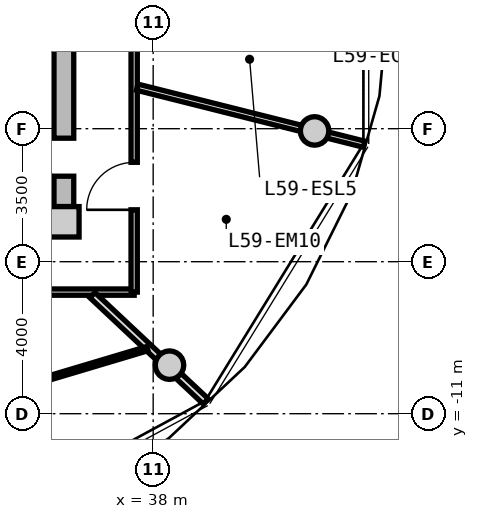
"""IFC4 building model, lengths in metres.
Left out: names, types, materials, properties, quantities, classifications, styles, units other than length and angle.
Written with IfcOpenShell. Run it as: python <this file> out.ifc"""

import sys

from ifc_helpers import new_model, si_unit, direction, frame, frame_2d, origin, origin_2d, place, context, subcontext, project, spatial, rectangle, circle, extrude, source, transform, mapped, element, fill, save


model = new_model("IFC4")
c1 = context("Model", 3, precision=1e-05, world=origin(), true_north=direction((0.0, 1.0)))
c2 = subcontext(c1, "Body", "Model", "MODEL_VIEW")
j1 = project(units=[si_unit("LENGTHUNIT", "METRE"), si_unit("PLANEANGLEUNIT", "RADIAN")], contexts=[c1])
p1 = place(None, origin())
s1 = spatial("IfcSite", under=j1, at=p1, CompositionType="ELEMENT")
p2 = place(p1, origin())
s2 = spatial("IfcBuilding", under=s1, at=p2, CompositionType="ELEMENT")
p3 = place(p2, frame((0.0, 0.0, 190.65)))
s3 = spatial("IfcBuildingStorey", under=s2, at=p3, CompositionType="ELEMENT", Elevation=190.65)
m1 = source(origin(), c2, "Body", "SweptSolid", [
    extrude(rectangle(XDim=0.8, YDim=0.8, at=origin_2d()), origin(), (0.0, 0.0, 1.0), 3.05),
])
p4 = place(p3, frame((35.65, -5.95, 0.0), z_axis=(0.0, 0.0, 1.0), x_axis=(1.0, 0.0, 0.0)))
e1 = element("IfcColumn", 1, at=p4, inside=s3, PredefinedType="COLUMN", context=c2, shape_type="MappedRepresentation", body=[
    mapped(m1, transform((0.0, 0.0, 0.0), x_axis=(1.0, 0.0, 0.0), y_axis=(0.0, 1.0, 0.0), z_axis=(0.0, 0.0, 1.0), scale=1.0)),
])
m2 = source(origin(), c2, "Body", "SweptSolid", [
    extrude(rectangle(XDim=11.1, YDim=0.52, at=frame_2d((5.55, 0.0))), origin(), (0.0, 0.0, 1.0), 2.81),
])
p5 = place(p3, frame((35.65, 5.55, 0.0), z_axis=(0.0, 0.0, 1.0), x_axis=(0.0, -1.0, 0.0)))
e2 = element("IfcWall", 2, at=p5, inside=s3, PredefinedType="SHEAR", context=c2, shape_type="MappedRepresentation", body=[
    mapped(m2, transform((0.0, 0.0, 0.0), x_axis=(1.0, 0.0, 0.0), y_axis=(0.0, 1.0, 0.0), z_axis=(0.0, 0.0, 1.0), scale=1.0)),
])
p6 = place(p5, frame((5.65, 0.0, 0.0)))
e3 = element("IfcOpeningElement", 3, at=p6, cuts=e2, PredefinedType="OPENING", context=c2, shape_type="SweptSolid", body=[
    extrude(rectangle(XDim=1.2, YDim=2.15, at=frame_2d((0.6, 1.075))), frame((0.0, 0.27, 0.0), z_axis=(0.0, -1.0, 0.0), x_axis=(1.0, 0.0, 0.0)), (0.0, 0.0, 1.0), 0.54),
])
p7 = place(p5, frame((9.3, 0.0, 0.0)))
e4 = element("IfcOpeningElement", 4, at=p7, cuts=e2, PredefinedType="OPENING", context=c2, shape_type="SweptSolid", body=[
    extrude(rectangle(XDim=1.0, YDim=2.1, at=frame_2d((0.5, 1.05))), frame((0.0, 0.27, 0.0), z_axis=(0.0, -1.0, 0.0), x_axis=(1.0, 0.0, 0.0)), (0.0, 0.0, 1.0), 0.54),
])
m3 = source(origin(), c2, "Body", "SweptSolid", [
    extrude(circle(Radius=0.375, at=origin_2d()), origin(), (0.0, 0.0, 1.0), 3.47),
])
for number, where, z_axis, x_axis in (
    (5, (38.43, -9.723, -0.42), (0.0, 0.0, 1.0), (1.0, 0.0, 0.0)),
    (6, (42.247, -3.559, -0.42), (0.0, 0.0, 1.0), (1.0, 0.0, 0.0)),
):
    element("IfcColumn", number, at=place(p3, frame(where, z_axis=z_axis, x_axis=x_axis)), inside=s3, PredefinedType="COLUMN", context=c2, shape_type="MappedRepresentation", body=[
        mapped(m3, transform((0.0, 0.0, 0.0), x_axis=(1.0, 0.0, 0.0), y_axis=(0.0, 1.0, 0.0), z_axis=(0.0, 0.0, 1.0), scale=1.0)),
    ])
m4 = source(origin(), c2, "Body", "SweptSolid", [
    extrude(rectangle(XDim=19.0, YDim=0.165, at=frame_2d((9.5, 0.0))), origin(), (0.0, 0.0, 1.0), 2.795),
])
p8 = place(p3, frame((37.5, -7.8, 0.0), z_axis=(0.0, 0.0, 1.0), x_axis=(-1.0, 0.0, 0.0)))
e7 = element("IfcWall", 7, at=p8, inside=s3, PredefinedType="PARTITIONING", context=c2, shape_type="MappedRepresentation", body=[
    mapped(m4, transform((0.0, 0.0, 0.0), x_axis=(1.0, 0.0, 0.0), y_axis=(0.0, 1.0, 0.0), z_axis=(0.0, 0.0, 1.0), scale=1.0)),
])
p9 = place(p8, frame((9.392, 0.0, 0.0)))
e8 = element("IfcOpeningElement", 8, at=p9, cuts=e7, PredefinedType="OPENING", context=c2, shape_type="SweptSolid", body=[
    extrude(rectangle(XDim=1.05, YDim=2.15, at=frame_2d((0.525, 1.075))), frame((0.0, 0.093, 0.0), z_axis=(0.0, -1.0, 0.0), x_axis=(1.0, 0.0, 0.0)), (0.0, 0.0, 1.0), 0.185),
])
m5 = source(origin(), c2, "Body", "SweptSolid", [
    extrude(rectangle(XDim=6.88, YDim=0.165, at=frame_2d((3.44, 0.0))), origin(), (0.0, 0.0, 1.0), 2.795),
])
p10 = place(p3, frame((37.5, -0.92, 0.0), z_axis=(0.0, 0.0, 1.0), x_axis=(0.0, -1.0, 0.0)))
e9 = element("IfcWall", 9, at=p10, inside=s3, PredefinedType="PARTITIONING", context=c2, shape_type="MappedRepresentation", body=[
    mapped(m5, transform((0.0, 0.0, 0.0), x_axis=(1.0, 0.0, 0.0), y_axis=(0.0, 1.0, 0.0), z_axis=(0.0, 0.0, 1.0), scale=1.0)),
])
p11 = place(p10, frame((3.464, 0.0, 0.0)))
e10 = element("IfcOpeningElement", 10, at=p11, cuts=e9, PredefinedType="OPENING", context=c2, shape_type="SweptSolid", body=[
    extrude(rectangle(XDim=1.25, YDim=2.2, at=frame_2d((0.625, 1.1))), frame((0.0, 0.093, 0.0), z_axis=(0.0, -1.0, 0.0), x_axis=(1.0, 0.0, 0.0)), (0.0, 0.0, 1.0), 0.185),
])
m6 = source(origin(), c2, "Body", "SweptSolid", [
    extrude(rectangle(XDim=6.157, YDim=0.165, at=frame_2d((3.079, 0.0))), origin(), (0.0, 0.0, 1.0), 2.395),
])
p12 = place(p3, frame((37.58, -2.407, 0.0), z_axis=(0.0, 0.0, 1.0), x_axis=(0.969840867184, -0.243738984038, 0.0)))
e11 = element("IfcWall", 11, at=p12, inside=s3, PredefinedType="PARTITIONING", context=c2, shape_type="MappedRepresentation", body=[
    mapped(m6, transform((0.0, 0.0, 0.0), x_axis=(1.0, 0.0, 0.0), y_axis=(0.0, 1.0, 0.0), z_axis=(0.0, 0.0, 1.0), scale=1.0)),
])
m7 = source(origin(), c2, "Body", "SweptSolid", [
    extrude(rectangle(XDim=4.089, YDim=0.19, at=frame_2d((2.044, 0.0))), origin(), (0.0, 0.0, 1.0), 2.395),
])
p13 = place(p3, frame((36.402, -7.88, 0.0), z_axis=(0.0, 0.0, 1.0), x_axis=(0.729401273609, -0.684086092577, 0.0)))
e12 = element("IfcWall", 12, at=p13, inside=s3, PredefinedType="PARTITIONING", context=c2, shape_type="MappedRepresentation", body=[
    mapped(m7, transform((0.0, 0.0, 0.0), x_axis=(1.0, 0.0, 0.0), y_axis=(0.0, 1.0, 0.0), z_axis=(0.0, 0.0, 1.0), scale=1.0)),
])
m8 = source(origin(), c2, "Body", "SweptSolid", [
    extrude(rectangle(XDim=6.936, YDim=0.115, at=frame_2d((3.468, 0.0))), origin(), (0.0, 0.0, 1.0), 2.795),
])
p14 = place(p3, frame((31.203, -11.272, 0.0), z_axis=(0.0, 0.0, 1.0), x_axis=(0.958186895835, 0.286143098205, 0.0)))
e13 = element("IfcWall", 13, at=p14, inside=s3, PredefinedType="PARTITIONING", context=c2, shape_type="MappedRepresentation", body=[
    mapped(m8, transform((0.0, 0.0, 0.0), x_axis=(1.0, 0.0, 0.0), y_axis=(0.0, 1.0, 0.0), z_axis=(0.0, 0.0, 1.0), scale=1.0)),
])
p15 = place(p14, frame((2.993, 0.0, 0.0)))
e14 = element("IfcOpeningElement", 14, at=p15, cuts=e13, PredefinedType="OPENING", context=c2, shape_type="SweptSolid", body=[
    extrude(rectangle(XDim=0.95, YDim=2.1, at=frame_2d((0.475, 1.05))), frame((0.0, 0.067, 0.0), z_axis=(0.0, -1.0, 0.0), x_axis=(1.0, 0.0, 0.0)), (0.0, 0.0, 1.0), 0.135),
])
m9 = source(origin(), c2, "Body", "SweptSolid", [
    extrude(rectangle(XDim=1.0, YDim=2.1, at=frame_2d((0.5, 1.05))), frame((0.0, 0.025, 0.0), z_axis=(0.0, -1.0, 0.0), x_axis=(1.0, 0.0, 0.0)), (0.0, 0.0, 1.0), 0.05),
])
p16 = place(p7, frame((1.0, 0.0, 0.0), z_axis=(0.0, 0.0, 1.0), x_axis=(-1.0, 0.0, 0.0)))
e15 = element("IfcDoor", 15, at=p16, inside=s3, OperationType="SINGLE_SWING_RIGHT", PredefinedType="DOOR", context=c2, shape_type="MappedRepresentation", body=[
    mapped(m9, transform((0.0, 0.0, 0.0), x_axis=(1.0, 0.0, 0.0), y_axis=(0.0, 1.0, 0.0), z_axis=(0.0, 0.0, 1.0), scale=1.0)),
])
fill(e4, e15)
m10 = source(origin(), c2, "Body", "SweptSolid", [
    extrude(rectangle(XDim=1.25, YDim=2.2, at=frame_2d((0.625, 1.1))), frame((0.0, 0.025, 0.0), z_axis=(0.0, -1.0, 0.0), x_axis=(1.0, 0.0, 0.0)), (0.0, 0.0, 1.0), 0.05),
])
p17 = place(p11, frame((1.25, 0.0, 0.0), z_axis=(0.0, 0.0, 1.0), x_axis=(-1.0, 0.0, 0.0)))
e16 = element("IfcDoor", 16, at=p17, inside=s3, OperationType="SINGLE_SWING_LEFT", PredefinedType="DOOR", context=c2, shape_type="MappedRepresentation", body=[
    mapped(m10, transform((0.0, 0.0, 0.0), x_axis=(1.0, 0.0, 0.0), y_axis=(0.0, 1.0, 0.0), z_axis=(0.0, 0.0, 1.0), scale=1.0)),
])
fill(e10, e16)
save(model, sys.argv[1])
